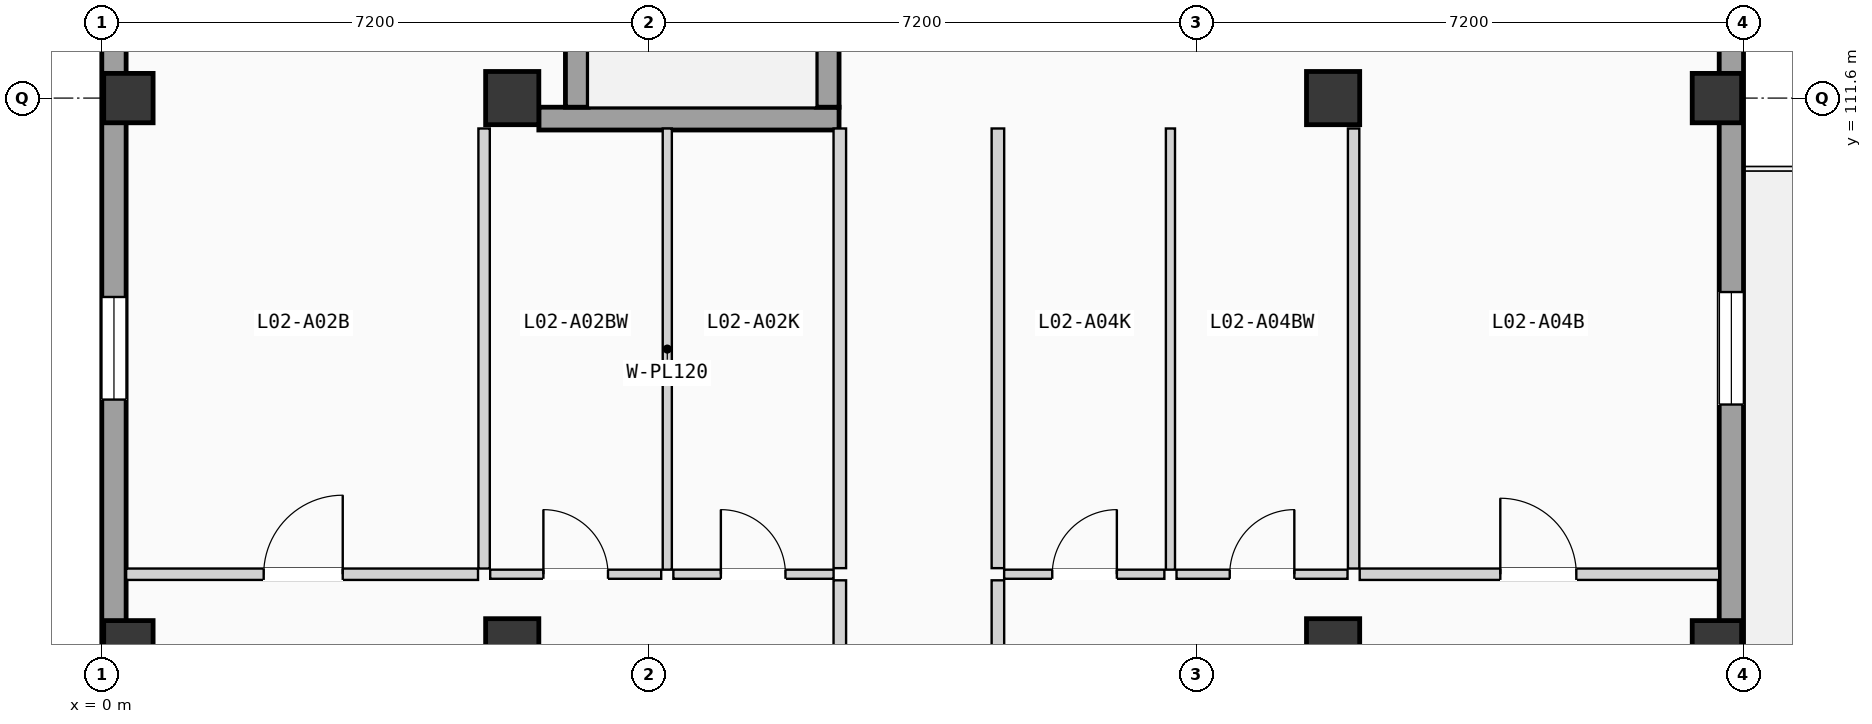
"""IFC4 building model, lengths in metres.
Left out: names, types, materials, properties, quantities, classifications, styles, units other than length and angle.
Written with IfcOpenShell. Run it as: python <this file> out.ifc"""

import sys

from ifc_helpers import new_model, si_unit, direction, frame, frame_2d, origin, origin_2d, place, context, subcontext, project, spatial, rectangle, extrude, element, fill, save


model = new_model("IFC4")
c1 = context("Model", 3, precision=1e-05, world=origin(), true_north=direction((0.0, 1.0)))
c2 = subcontext(c1, "Body", "Model", "MODEL_VIEW")
j1 = project(units=[si_unit("LENGTHUNIT", "METRE"), si_unit("PLANEANGLEUNIT", "RADIAN")], contexts=[c1])
p1 = place(None, origin())
s1 = spatial("IfcSite", under=j1, at=p1, CompositionType="ELEMENT")
p2 = place(p1, origin())
s2 = spatial("IfcBuilding", under=s1, at=p2, CompositionType="ELEMENT")
p3 = place(p2, frame((0.0, 0.0, 8.575)))
s3 = spatial("IfcBuildingStorey", under=s2, at=p3, CompositionType="ELEMENT", Elevation=8.575)
for number, where, z_axis, x_axis in (
    (1, (0.35, 104.4, 0.0), (0.0, 0.0, 1.0), (1.0, 0.0, 0.0)),
    (2, (0.35, 111.6, 0.0), (0.0, 0.0, 1.0), (1.0, 0.0, 0.0)),
):
    element("IfcColumn", number, at=place(p3, frame(where, z_axis=z_axis, x_axis=x_axis)), inside=s3, PredefinedType="COLUMN", context=c2, shape_type="SweptSolid", body=[
        extrude(rectangle(XDim=0.65, YDim=0.65, at=origin_2d()), origin(), (0.0, 0.0, 1.0), 3.5),
    ])
for number, where, z_axis, x_axis in (
    (3, (5.4, 104.4, 0.0), (0.0, 0.0, 1.0), (1.0, 0.0, 0.0)),
    (4, (5.4, 111.6, 0.0), (0.0, 0.0, 1.0), (1.0, 0.0, 0.0)),
    (5, (16.2, 104.4, 0.0), (0.0, 0.0, 1.0), (1.0, 0.0, 0.0)),
    (6, (16.2, 111.6, 0.0), (0.0, 0.0, 1.0), (1.0, 0.0, 0.0)),
):
    element("IfcColumn", number, at=place(p3, frame(where, z_axis=z_axis, x_axis=x_axis)), inside=s3, PredefinedType="COLUMN", context=c2, shape_type="SweptSolid", body=[
        extrude(rectangle(XDim=0.7, YDim=0.7, at=origin_2d()), origin(), (0.0, 0.0, 1.0), 3.5),
    ])
for number, where, z_axis, x_axis in (
    (7, (21.25, 104.4, 0.0), (0.0, 0.0, 1.0), (1.0, 0.0, 0.0)),
    (8, (21.25, 111.6, 0.0), (0.0, 0.0, 1.0), (1.0, 0.0, 0.0)),
):
    element("IfcColumn", number, at=place(p3, frame(where, z_axis=z_axis, x_axis=x_axis)), inside=s3, PredefinedType="COLUMN", context=c2, shape_type="SweptSolid", body=[
        extrude(rectangle(XDim=0.65, YDim=0.65, at=origin_2d()), origin(), (0.0, 0.0, 1.0), 3.5),
    ])
p4 = place(p3, frame((0.16, 68.72, 0.0), z_axis=(0.0, 0.0, 1.0), x_axis=(0.0, 1.0, 0.0)))
e9 = element("IfcWall", 9, at=p4, inside=s3, PredefinedType="SOLIDWALL", context=c2, shape_type="SweptSolid", body=[
    extrude(rectangle(XDim=49.76, YDim=0.32, at=frame_2d((24.88, 0.0))), origin(), (0.0, 0.0, 1.0), 3.24),
])
p5 = place(p4, frame((15.705, 0.0, 0.755)))
e10 = element("IfcOpeningElement", 10, at=p5, cuts=e9, PredefinedType="OPENING", context=c2, shape_type="SweptSolid", body=[
    extrude(rectangle(XDim=1.25, YDim=1.8, at=frame_2d((0.625, 0.9))), frame((0.0, 0.17, 0.0), z_axis=(0.0, -1.0, 0.0), x_axis=(1.0, 0.0, 0.0)), (0.0, 0.0, 1.0), 0.34),
])
p6 = place(p4, frame((9.061, 0.0, 0.9)))
e11 = element("IfcOpeningElement", 11, at=p6, cuts=e9, PredefinedType="OPENING", context=c2, shape_type="SweptSolid", body=[
    extrude(rectangle(XDim=1.35, YDim=1.2, at=frame_2d((0.675, 0.6))), frame((0.0, 0.17, 0.0), z_axis=(0.0, -1.0, 0.0), x_axis=(1.0, 0.0, 0.0)), (0.0, 0.0, 1.0), 0.34),
])
p7 = place(p4, frame((19.065, 0.0, 0.9)))
e12 = element("IfcOpeningElement", 12, at=p7, cuts=e9, PredefinedType="OPENING", context=c2, shape_type="SweptSolid", body=[
    extrude(rectangle(XDim=1.35, YDim=1.35, at=frame_2d((0.675, 0.675))), frame((0.0, 0.17, 0.0), z_axis=(0.0, -1.0, 0.0), x_axis=(1.0, 0.0, 0.0)), (0.0, 0.0, 1.0), 0.34),
])
p8 = place(p4, frame((31.784, 0.0, 0.9)))
e13 = element("IfcOpeningElement", 13, at=p8, cuts=e9, PredefinedType="OPENING", context=c2, shape_type="SweptSolid", body=[
    extrude(rectangle(XDim=1.35, YDim=1.5, at=frame_2d((0.675, 0.75))), frame((0.0, 0.17, 0.0), z_axis=(0.0, -1.0, 0.0), x_axis=(1.0, 0.0, 0.0)), (0.0, 0.0, 1.0), 0.34),
])
p9 = place(p4, frame((25.211, 0.0, 0.9)))
e14 = element("IfcOpeningElement", 14, at=p9, cuts=e9, PredefinedType="OPENING", context=c2, shape_type="SweptSolid", body=[
    extrude(rectangle(XDim=1.35, YDim=1.65, at=frame_2d((0.675, 0.825))), frame((0.0, 0.17, 0.0), z_axis=(0.0, -1.0, 0.0), x_axis=(1.0, 0.0, 0.0)), (0.0, 0.0, 1.0), 0.34),
])
p10 = place(p4, frame((38.913, 0.0, 0.755)))
e15 = element("IfcOpeningElement", 15, at=p10, cuts=e9, PredefinedType="OPENING", context=c2, shape_type="SweptSolid", body=[
    extrude(rectangle(XDim=1.35, YDim=1.8, at=frame_2d((0.675, 0.9))), frame((0.0, 0.17, 0.0), z_axis=(0.0, -1.0, 0.0), x_axis=(1.0, 0.0, 0.0)), (0.0, 0.0, 1.0), 0.34),
])
p11 = place(p3, frame((21.44, 68.72, 0.0), z_axis=(0.0, 0.0, 1.0), x_axis=(0.0, 1.0, 0.0)))
e16 = element("IfcWall", 16, at=p11, inside=s3, PredefinedType="SOLIDWALL", context=c2, shape_type="SweptSolid", body=[
    extrude(rectangle(XDim=49.76, YDim=0.32, at=frame_2d((24.88, 0.0))), origin(), (0.0, 0.0, 1.0), 3.24),
])
p12 = place(p11, frame((16.27, 0.0, 0.0)))
e17 = element("IfcOpeningElement", 17, at=p12, cuts=e16, PredefinedType="OPENING", context=c2, shape_type="SweptSolid", body=[
    extrude(rectangle(XDim=0.95, YDim=2.15, at=frame_2d((0.475, 1.075))), frame((0.0, 0.17, 0.0), z_axis=(0.0, -1.0, 0.0), x_axis=(1.0, 0.0, 0.0)), (0.0, 0.0, 1.0), 0.34),
])
p13 = place(p11, frame((8.996, 0.0, 0.9)))
e18 = element("IfcOpeningElement", 18, at=p13, cuts=e16, PredefinedType="OPENING", context=c2, shape_type="SweptSolid", body=[
    extrude(rectangle(XDim=1.48, YDim=1.2, at=frame_2d((0.74, 0.6))), frame((0.0, 0.17, 0.0), z_axis=(0.0, -1.0, 0.0), x_axis=(1.0, 0.0, 0.0)), (0.0, 0.0, 1.0), 0.34),
])
p14 = place(p11, frame((19.0, 0.0, 0.9)))
e19 = element("IfcOpeningElement", 19, at=p14, cuts=e16, PredefinedType="OPENING", context=c2, shape_type="SweptSolid", body=[
    extrude(rectangle(XDim=1.48, YDim=1.35, at=frame_2d((0.74, 0.675))), frame((0.0, 0.17, 0.0), z_axis=(0.0, -1.0, 0.0), x_axis=(1.0, 0.0, 0.0)), (0.0, 0.0, 1.0), 0.34),
])
p15 = place(p11, frame((32.365, 0.0, 0.0)))
e20 = element("IfcOpeningElement", 20, at=p15, cuts=e16, PredefinedType="OPENING", context=c2, shape_type="SweptSolid", body=[
    extrude(rectangle(XDim=1.08, YDim=2.18, at=frame_2d((0.54, 1.09))), frame((0.0, 0.17, 0.0), z_axis=(0.0, -1.0, 0.0), x_axis=(1.0, 0.0, 0.0)), (0.0, 0.0, 1.0), 0.34),
])
p16 = place(p11, frame((25.146, 0.0, 0.9)))
e21 = element("IfcOpeningElement", 21, at=p16, cuts=e16, PredefinedType="OPENING", context=c2, shape_type="SweptSolid", body=[
    extrude(rectangle(XDim=1.48, YDim=1.5, at=frame_2d((0.74, 0.75))), frame((0.0, 0.17, 0.0), z_axis=(0.0, -1.0, 0.0), x_axis=(1.0, 0.0, 0.0)), (0.0, 0.0, 1.0), 0.34),
])
p17 = place(p11, frame((38.848, 0.0, 0.9)))
e22 = element("IfcOpeningElement", 22, at=p17, cuts=e16, PredefinedType="OPENING", context=c2, shape_type="SweptSolid", body=[
    extrude(rectangle(XDim=1.48, YDim=1.65, at=frame_2d((0.74, 0.825))), frame((0.0, 0.17, 0.0), z_axis=(0.0, -1.0, 0.0), x_axis=(1.0, 0.0, 0.0)), (0.0, 0.0, 1.0), 0.34),
])
p18 = place(p3, frame((5.75, 111.33, 0.0), z_axis=(0.0, 0.0, 1.0), x_axis=(1.0, 0.0, 0.0)))
e23 = element("IfcWall", 23, at=p18, inside=s3, PredefinedType="SHEAR", context=c2, shape_type="SweptSolid", body=[
    extrude(rectangle(XDim=3.95, YDim=0.3, at=frame_2d((1.975, 0.0))), origin(), (0.0, 0.0, 1.0), 3.24),
])
p19 = place(p3, frame((6.25, 111.48, 0.0), z_axis=(0.0, 0.0, 1.0), x_axis=(0.0, 1.0, 0.0)))
e24 = element("IfcWall", 24, at=p19, inside=s3, PredefinedType="SHEAR", context=c2, shape_type="SweptSolid", body=[
    extrude(rectangle(XDim=7.0, YDim=0.3, at=frame_2d((3.5, 0.0))), origin(), (0.0, 0.0, 1.0), 3.24),
])
p20 = place(p3, frame((9.55, 111.48, 0.0), z_axis=(0.0, 0.0, 1.0), x_axis=(0.0, 1.0, 0.0)))
e25 = element("IfcWall", 25, at=p20, inside=s3, PredefinedType="SHEAR", context=c2, shape_type="SweptSolid", body=[
    extrude(rectangle(XDim=7.0, YDim=0.3, at=frame_2d((3.5, 0.0))), origin(), (0.0, 0.0, 1.0), 3.24),
])
p21 = place(p20, frame((5.625, 0.0, 0.0)))
e26 = element("IfcOpeningElement", 26, at=p21, cuts=e25, PredefinedType="OPENING", context=c2, shape_type="SweptSolid", body=[
    extrude(rectangle(XDim=1.15, YDim=2.12, at=frame_2d((0.575, 1.06))), frame((0.0, 0.16, 0.0), z_axis=(0.0, -1.0, 0.0), x_axis=(1.0, 0.0, 0.0)), (0.0, 0.0, 1.0), 0.32),
])
p22 = place(p3, frame((9.71, 98.227, 0.0), z_axis=(0.0, 0.0, 1.0), x_axis=(0.0, 1.0, 0.0)))
e27 = element("IfcWall", 27, at=p22, inside=s3, PredefinedType="PARTITIONING", context=c2, shape_type="SweptSolid", body=[
    extrude(rectangle(XDim=7.028, YDim=0.165, at=frame_2d((3.514, 0.0))), origin(), (0.0, 0.0, 1.0), 3.22),
])
p23 = place(p22, frame((3.024, 0.0, 0.0)))
e28 = element("IfcOpeningElement", 28, at=p23, cuts=e27, PredefinedType="OPENING", context=c2, shape_type="SweptSolid", body=[
    extrude(rectangle(XDim=0.98, YDim=2.08, at=frame_2d((0.49, 1.04))), frame((0.0, 0.093, 0.0), z_axis=(0.0, -1.0, 0.0), x_axis=(1.0, 0.0, 0.0)), (0.0, 0.0, 1.0), 0.185),
])
p24 = place(p3, frame((9.71, 105.415, 0.0), z_axis=(0.0, 0.0, 1.0), x_axis=(0.0, 1.0, 0.0)))
e29 = element("IfcWall", 29, at=p24, inside=s3, PredefinedType="PARTITIONING", context=c2, shape_type="SweptSolid", body=[
    extrude(rectangle(XDim=5.785, YDim=0.165, at=frame_2d((2.893, 0.0))), origin(), (0.0, 0.0, 1.0), 3.22),
])
p25 = place(p3, frame((11.79, 98.227, 0.0), z_axis=(0.0, 0.0, 1.0), x_axis=(0.0, 1.0, 0.0)))
e30 = element("IfcWall", 30, at=p25, inside=s3, PredefinedType="PARTITIONING", context=c2, shape_type="SweptSolid", body=[
    extrude(rectangle(XDim=7.028, YDim=0.165, at=frame_2d((3.514, 0.0))), origin(), (0.0, 0.0, 1.0), 3.22),
])
p26 = place(p25, frame((3.024, 0.0, 0.0)))
e31 = element("IfcOpeningElement", 31, at=p26, cuts=e30, PredefinedType="OPENING", context=c2, shape_type="SweptSolid", body=[
    extrude(rectangle(XDim=0.98, YDim=2.08, at=frame_2d((0.49, 1.04))), frame((0.0, 0.093, 0.0), z_axis=(0.0, -1.0, 0.0), x_axis=(1.0, 0.0, 0.0)), (0.0, 0.0, 1.0), 0.185),
])
p27 = place(p3, frame((11.79, 105.415, 0.0), z_axis=(0.0, 0.0, 1.0), x_axis=(0.0, 1.0, 0.0)))
e32 = element("IfcWall", 32, at=p27, inside=s3, PredefinedType="PARTITIONING", context=c2, shape_type="SweptSolid", body=[
    extrude(rectangle(XDim=5.785, YDim=0.165, at=frame_2d((2.893, 0.0))), origin(), (0.0, 0.0, 1.0), 3.22),
])
p28 = place(p3, frame((7.52, 105.335, 0.0), z_axis=(0.0, 0.0, 1.0), x_axis=(1.0, 0.0, 0.0)))
e33 = element("IfcWall", 33, at=p28, inside=s3, PredefinedType="PARTITIONING", context=c2, shape_type="SweptSolid", body=[
    extrude(rectangle(XDim=2.108, YDim=0.12, at=frame_2d((1.054, 0.0))), origin(), (0.0, 0.0, 1.0), 3.22),
])
p29 = place(p28, frame((0.625, 0.0, 0.0)))
e34 = element("IfcOpeningElement", 34, at=p29, cuts=e33, PredefinedType="OPENING", context=c2, shape_type="SweptSolid", body=[
    extrude(rectangle(XDim=0.85, YDim=2.01, at=frame_2d((0.425, 1.005))), frame((0.0, 0.07, 0.0), z_axis=(0.0, -1.0, 0.0), x_axis=(1.0, 0.0, 0.0)), (0.0, 0.0, 1.0), 0.14),
])
p30 = place(p3, frame((0.32, 105.335, 0.0), z_axis=(0.0, 0.0, 1.0), x_axis=(1.0, 0.0, 0.0)))
e35 = element("IfcWall", 35, at=p30, inside=s3, PredefinedType="PARTITIONING", context=c2, shape_type="SweptSolid", body=[
    extrude(rectangle(XDim=4.63, YDim=0.15, at=frame_2d((2.315, 0.0))), origin(), (0.0, 0.0, 1.0), 3.22),
])
p31 = place(p30, frame((1.81, 0.0, 0.0)))
e36 = element("IfcOpeningElement", 36, at=p31, cuts=e35, PredefinedType="OPENING", context=c2, shape_type="SweptSolid", body=[
    extrude(rectangle(XDim=1.04, YDim=2.08, at=frame_2d((0.52, 1.04))), frame((0.0, 0.085, 0.0), z_axis=(0.0, -1.0, 0.0), x_axis=(1.0, 0.0, 0.0)), (0.0, 0.0, 1.0), 0.17),
])
p32 = place(p3, frame((5.11, 105.335, 0.0), z_axis=(0.0, 0.0, 1.0), x_axis=(1.0, 0.0, 0.0)))
e37 = element("IfcWall", 37, at=p32, inside=s3, PredefinedType="PARTITIONING", context=c2, shape_type="SweptSolid", body=[
    extrude(rectangle(XDim=2.25, YDim=0.12, at=frame_2d((1.125, 0.0))), origin(), (0.0, 0.0, 1.0), 3.22),
])
p33 = place(p32, frame((0.7, 0.0, 0.0)))
e38 = element("IfcOpeningElement", 38, at=p33, cuts=e37, PredefinedType="OPENING", context=c2, shape_type="SweptSolid", body=[
    extrude(rectangle(XDim=0.85, YDim=2.01, at=frame_2d((0.425, 1.005))), frame((0.0, 0.07, 0.0), z_axis=(0.0, -1.0, 0.0), x_axis=(1.0, 0.0, 0.0)), (0.0, 0.0, 1.0), 0.14),
])
p34 = place(p3, frame((7.44, 105.395, 0.0), z_axis=(0.0, 0.0, 1.0), x_axis=(0.0, 1.0, 0.0)))
e39 = element("IfcWall", 39, at=p34, inside=s3, PredefinedType="PARTITIONING", context=c2, shape_type="SweptSolid", body=[
    extrude(rectangle(XDim=5.805, YDim=0.12, at=frame_2d((2.902, 0.0))), origin(), (0.0, 0.0, 1.0), 3.22),
])
p35 = place(p3, frame((5.03, 105.41, 0.0), z_axis=(0.0, 0.0, 1.0), x_axis=(0.0, 1.0, 0.0)))
e40 = element("IfcWall", 40, at=p35, inside=s3, PredefinedType="PARTITIONING", context=c2, shape_type="SweptSolid", body=[
    extrude(rectangle(XDim=5.79, YDim=0.15, at=frame_2d((2.895, 0.0))), origin(), (0.0, 0.0, 1.0), 3.22),
])
p36 = place(p3, frame((11.872, 105.335, 0.0), z_axis=(0.0, 0.0, 1.0), x_axis=(1.0, 0.0, 0.0)))
e41 = element("IfcWall", 41, at=p36, inside=s3, PredefinedType="PARTITIONING", context=c2, shape_type="SweptSolid", body=[
    extrude(rectangle(XDim=2.108, YDim=0.12, at=frame_2d((1.054, 0.0))), origin(), (0.0, 0.0, 1.0), 3.22),
])
p37 = place(p36, frame((0.633, 0.0, 0.0)))
e42 = element("IfcOpeningElement", 42, at=p37, cuts=e41, PredefinedType="OPENING", context=c2, shape_type="SweptSolid", body=[
    extrude(rectangle(XDim=0.85, YDim=2.01, at=frame_2d((0.425, 1.005))), frame((0.0, 0.07, 0.0), z_axis=(0.0, -1.0, 0.0), x_axis=(1.0, 0.0, 0.0)), (0.0, 0.0, 1.0), 0.14),
])
p38 = place(p3, frame((16.55, 105.335, 0.0), z_axis=(0.0, 0.0, 1.0), x_axis=(1.0, 0.0, 0.0)))
e43 = element("IfcWall", 43, at=p38, inside=s3, PredefinedType="PARTITIONING", context=c2, shape_type="SweptSolid", body=[
    extrude(rectangle(XDim=4.73, YDim=0.15, at=frame_2d((2.365, 0.0))), origin(), (0.0, 0.0, 1.0), 3.22),
])
p39 = place(p38, frame((1.85, 0.0, 0.0)))
e44 = element("IfcOpeningElement", 44, at=p39, cuts=e43, PredefinedType="OPENING", context=c2, shape_type="SweptSolid", body=[
    extrude(rectangle(XDim=1.0, YDim=2.06, at=frame_2d((0.5, 1.03))), frame((0.0, 0.085, 0.0), z_axis=(0.0, -1.0, 0.0), x_axis=(1.0, 0.0, 0.0)), (0.0, 0.0, 1.0), 0.17),
])
p40 = place(p3, frame((14.14, 105.335, 0.0), z_axis=(0.0, 0.0, 1.0), x_axis=(1.0, 0.0, 0.0)))
e45 = element("IfcWall", 45, at=p40, inside=s3, PredefinedType="PARTITIONING", context=c2, shape_type="SweptSolid", body=[
    extrude(rectangle(XDim=2.25, YDim=0.12, at=frame_2d((1.125, 0.0))), origin(), (0.0, 0.0, 1.0), 3.22),
])
p41 = place(p40, frame((0.7, 0.0, 0.0)))
e46 = element("IfcOpeningElement", 46, at=p41, cuts=e45, PredefinedType="OPENING", context=c2, shape_type="SweptSolid", body=[
    extrude(rectangle(XDim=0.85, YDim=2.01, at=frame_2d((0.425, 1.005))), frame((0.0, 0.07, 0.0), z_axis=(0.0, -1.0, 0.0), x_axis=(1.0, 0.0, 0.0)), (0.0, 0.0, 1.0), 0.14),
])
p42 = place(p3, frame((14.06, 105.395, 0.0), z_axis=(0.0, 0.0, 1.0), x_axis=(0.0, 1.0, 0.0)))
e47 = element("IfcWall", 47, at=p42, inside=s3, PredefinedType="PARTITIONING", context=c2, shape_type="SweptSolid", body=[
    extrude(rectangle(XDim=5.805, YDim=0.12, at=frame_2d((2.902, 0.0))), origin(), (0.0, 0.0, 1.0), 3.22),
])
p43 = place(p3, frame((16.47, 105.41, 0.0), z_axis=(0.0, 0.0, 1.0), x_axis=(0.0, 1.0, 0.0)))
e48 = element("IfcWall", 48, at=p43, inside=s3, PredefinedType="PARTITIONING", context=c2, shape_type="SweptSolid", body=[
    extrude(rectangle(XDim=5.79, YDim=0.15, at=frame_2d((2.895, 0.0))), origin(), (0.0, 0.0, 1.0), 3.22),
])
p44 = place(p10, origin())
e49 = element("IfcWindow", 49, at=p44, inside=s3, PartitioningType="SINGLE_PANEL", PredefinedType="WINDOW", context=c2, shape_type="SweptSolid", body=[
    extrude(rectangle(XDim=1.35, YDim=1.8, at=frame_2d((0.675, 0.9))), frame((0.0, 0.03, 0.0), z_axis=(0.0, -1.0, 0.0), x_axis=(1.0, 0.0, 0.0)), (0.0, 0.0, 1.0), 0.06),
])
fill(e15, e49)
p45 = place(p17, origin())
e50 = element("IfcWindow", 50, at=p45, inside=s3, PartitioningType="SINGLE_PANEL", PredefinedType="WINDOW", context=c2, shape_type="SweptSolid", body=[
    extrude(rectangle(XDim=1.48, YDim=1.65, at=frame_2d((0.74, 0.825))), frame((0.0, 0.03, 0.0), z_axis=(0.0, -1.0, 0.0), x_axis=(1.0, 0.0, 0.0)), (0.0, 0.0, 1.0), 0.06),
])
fill(e22, e50)
p46 = place(p29, origin())
e51 = element("IfcDoor", 51, at=p46, inside=s3, OperationType="SINGLE_SWING_LEFT", PredefinedType="DOOR", context=c2, shape_type="SweptSolid", body=[
    extrude(rectangle(XDim=0.85, YDim=2.01, at=frame_2d((0.425, 1.005))), frame((0.0, 0.025, 0.0), z_axis=(0.0, -1.0, 0.0), x_axis=(1.0, 0.0, 0.0)), (0.0, 0.0, 1.0), 0.05),
])
fill(e34, e51)
p47 = place(p31, origin())
e52 = element("IfcDoor", 52, at=p47, inside=s3, OperationType="SINGLE_SWING_RIGHT", PredefinedType="DOOR", context=c2, shape_type="SweptSolid", body=[
    extrude(rectangle(XDim=1.04, YDim=2.08, at=frame_2d((0.52, 1.04))), frame((0.0, 0.025, 0.0), z_axis=(0.0, -1.0, 0.0), x_axis=(1.0, 0.0, 0.0)), (0.0, 0.0, 1.0), 0.05),
])
fill(e36, e52)
p48 = place(p33, origin())
e53 = element("IfcDoor", 53, at=p48, inside=s3, OperationType="SINGLE_SWING_LEFT", PredefinedType="DOOR", context=c2, shape_type="SweptSolid", body=[
    extrude(rectangle(XDim=0.85, YDim=2.01, at=frame_2d((0.425, 1.005))), frame((0.0, 0.025, 0.0), z_axis=(0.0, -1.0, 0.0), x_axis=(1.0, 0.0, 0.0)), (0.0, 0.0, 1.0), 0.05),
])
fill(e38, e53)
p49 = place(p37, origin())
e54 = element("IfcDoor", 54, at=p49, inside=s3, OperationType="SINGLE_SWING_RIGHT", PredefinedType="DOOR", context=c2, shape_type="SweptSolid", body=[
    extrude(rectangle(XDim=0.85, YDim=2.01, at=frame_2d((0.425, 1.005))), frame((0.0, 0.025, 0.0), z_axis=(0.0, -1.0, 0.0), x_axis=(1.0, 0.0, 0.0)), (0.0, 0.0, 1.0), 0.05),
])
fill(e42, e54)
p50 = place(p39, origin())
e55 = element("IfcDoor", 55, at=p50, inside=s3, OperationType="SINGLE_SWING_LEFT", PredefinedType="DOOR", context=c2, shape_type="SweptSolid", body=[
    extrude(rectangle(XDim=1.0, YDim=2.06, at=frame_2d((0.5, 1.03))), frame((0.0, 0.025, 0.0), z_axis=(0.0, -1.0, 0.0), x_axis=(1.0, 0.0, 0.0)), (0.0, 0.0, 1.0), 0.05),
])
fill(e44, e55)
p51 = place(p41, origin())
e56 = element("IfcDoor", 56, at=p51, inside=s3, OperationType="SINGLE_SWING_RIGHT", PredefinedType="DOOR", context=c2, shape_type="SweptSolid", body=[
    extrude(rectangle(XDim=0.85, YDim=2.01, at=frame_2d((0.425, 1.005))), frame((0.0, 0.025, 0.0), z_axis=(0.0, -1.0, 0.0), x_axis=(1.0, 0.0, 0.0)), (0.0, 0.0, 1.0), 0.05),
])
fill(e46, e56)
save(model, sys.argv[1])
